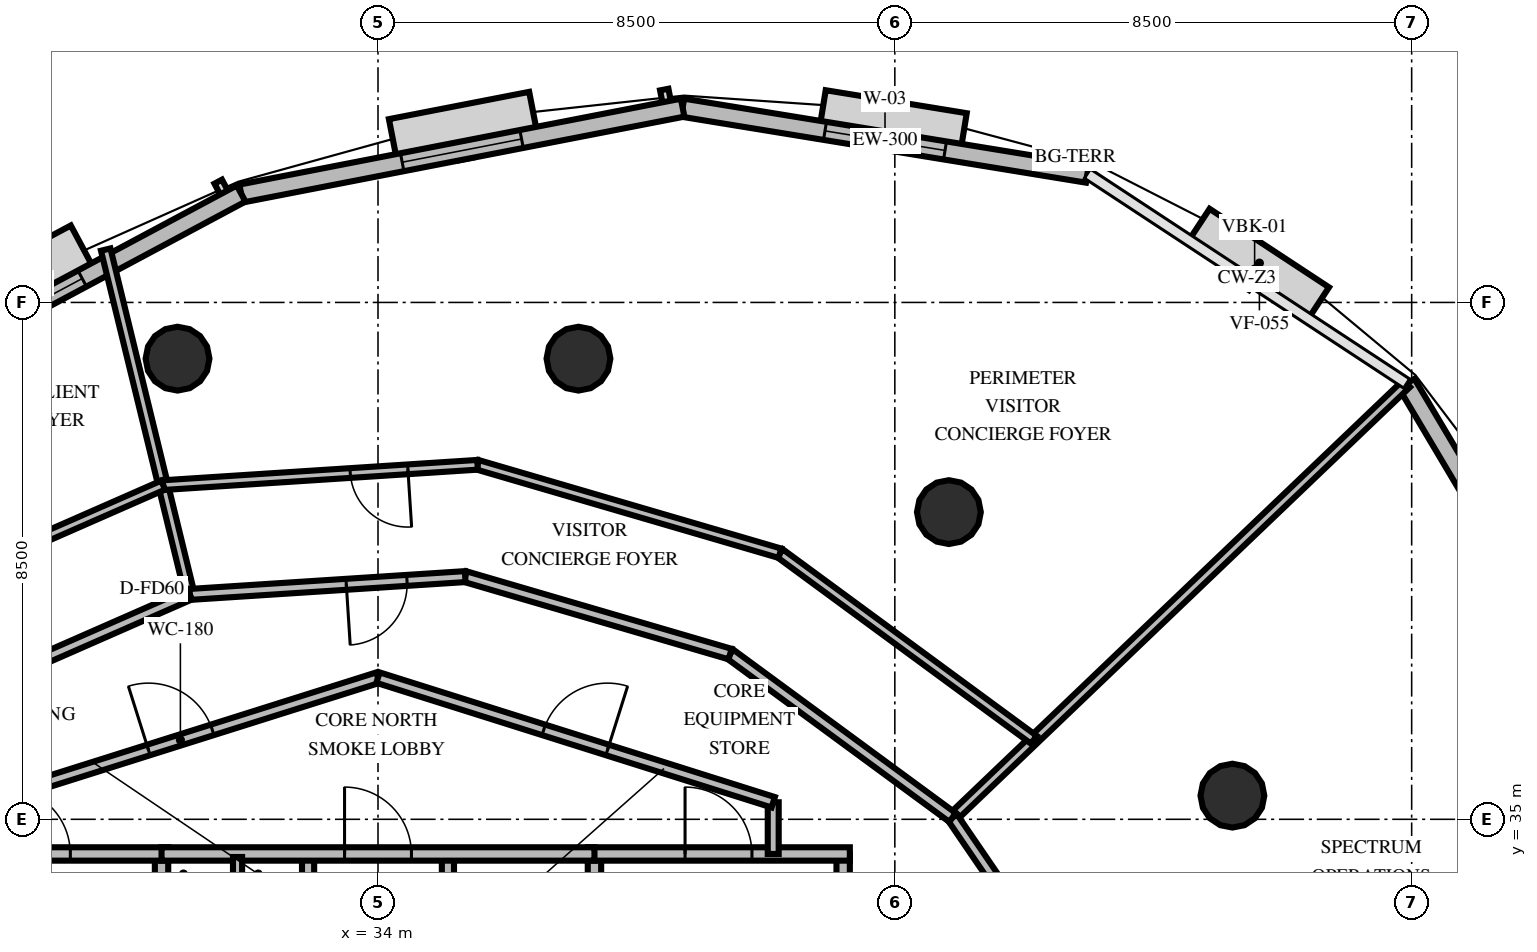
"""IFC4 building model, lengths in metres.
Left out: names, types, materials, properties, quantities, classifications, styles, units other than length and angle.
Written with IfcOpenShell. Run it as: python <this file> out.ifc"""

import sys

from ifc_helpers import new_model, si_unit, direction, frame, frame_2d, origin, origin_2d, place, context, subcontext, project, spatial, rectangle, circle, extrude, element, fill, save


model = new_model("IFC4")
c1 = context("Model", 3, precision=1e-05, world=origin(), true_north=direction((0.0, 1.0)))
c2 = subcontext(c1, "Body", "Model", "MODEL_VIEW")
j1 = project(units=[si_unit("LENGTHUNIT", "METRE"), si_unit("PLANEANGLEUNIT", "RADIAN")], contexts=[c1])
p1 = place(None, origin())
s1 = spatial("IfcSite", under=j1, at=p1, CompositionType="ELEMENT")
p2 = place(p1, origin())
s2 = spatial("IfcBuilding", under=s1, at=p2, CompositionType="ELEMENT")
p3 = place(p2, frame((0.0, 0.0, 213.2)))
s3 = spatial("IfcBuildingStorey", under=s2, at=p3, CompositionType="ELEMENT", Elevation=213.2)
for number, where, z_axis, x_axis in (
    (1, (48.052, 35.389, 0.0), (0.0, 0.0, 1.0), (1.0, 0.0, 0.0)),
    (2, (43.389, 40.052, 0.0), (0.0, 0.0, 1.0), (1.0, 0.0, 0.0)),
    (3, (37.297, 42.575, 0.0), (0.0, 0.0, 1.0), (1.0, 0.0, 0.0)),
    (4, (30.703, 42.575, 0.0), (0.0, 0.0, 1.0), (1.0, 0.0, 0.0)),
):
    element("IfcColumn", number, at=place(p3, frame(where, z_axis=z_axis, x_axis=x_axis)), inside=s3, PredefinedType="COLUMN", context=c2, shape_type="SweptSolid", body=[
        extrude(circle(Radius=0.525, at=origin_2d()), origin(), (0.0, 0.0, 1.0), 3.6),
    ])
p4 = place(p3, frame((45.667, 45.618, 0.0), z_axis=(0.0, 0.0, 1.0), x_axis=(-0.986978419701, 0.160852724701, 0.0)))
e5 = element("IfcWall", 5, at=p4, inside=s3, PredefinedType="SOLIDWALL", context=c2, shape_type="SweptSolid", body=[
    extrude(rectangle(XDim=6.745, YDim=0.3, at=frame_2d((3.373, 0.0))), origin(), (0.0, 0.0, 1.0), 2.66),
])
p5 = place(p4, frame((2.373, 0.0, 0.8)))
e6 = element("IfcOpeningElement", 6, at=p5, cuts=e5, PredefinedType="OPENING", context=c2, shape_type="SweptSolid", body=[
    extrude(rectangle(XDim=2.0, YDim=1.85, at=frame_2d((1.0, 0.925))), frame((0.0, 0.16, 0.0), z_axis=(0.0, -1.0, 0.0), x_axis=(1.0, 0.0, 0.0)), (0.0, 0.0, 1.0), 0.32),
])
p6 = place(p3, frame((39.01, 46.703, 0.0), z_axis=(0.0, 0.0, 1.0), x_axis=(-0.9816114389, -0.190889976216, 0.0)))
e7 = element("IfcWall", 7, at=p6, inside=s3, PredefinedType="SOLIDWALL", context=c2, shape_type="SweptSolid", body=[
    extrude(rectangle(XDim=7.397, YDim=0.3, at=frame_2d((3.699, 0.0))), origin(), (0.0, 0.0, 1.0), 2.66),
])
p7 = place(p6, frame((2.699, 0.0, 0.8)))
e8 = element("IfcOpeningElement", 8, at=p7, cuts=e7, PredefinedType="OPENING", context=c2, shape_type="SweptSolid", body=[
    extrude(rectangle(XDim=2.0, YDim=1.85, at=frame_2d((1.0, 0.925))), frame((0.0, 0.16, 0.0), z_axis=(0.0, -1.0, 0.0), x_axis=(1.0, 0.0, 0.0)), (0.0, 0.0, 1.0), 0.32),
])
p8 = place(p3, frame((31.749, 45.291, 0.0), z_axis=(0.0, 0.0, 1.0), x_axis=(-0.881775109683, -0.47167007107, 0.0)))
e9 = element("IfcWall", 9, at=p8, inside=s3, PredefinedType="SOLIDWALL", context=c2, shape_type="SweptSolid", body=[
    extrude(rectangle(XDim=7.927, YDim=0.3, at=frame_2d((3.964, 0.0))), origin(), (0.0, 0.0, 1.0), 2.66),
])
p9 = place(p8, frame((2.964, 0.0, 0.8)))
e10 = element("IfcOpeningElement", 10, at=p9, cuts=e9, PredefinedType="OPENING", context=c2, shape_type="SweptSolid", body=[
    extrude(rectangle(XDim=2.0, YDim=1.85, at=frame_2d((1.0, 0.925))), frame((0.0, 0.16, 0.0), z_axis=(0.0, -1.0, 0.0), x_axis=(1.0, 0.0, 0.0)), (0.0, 0.0, 1.0), 0.32),
])
p10 = place(p3, frame((54.127, 36.766, 0.0), z_axis=(0.0, 0.0, 1.0), x_axis=(-0.510856559467, 0.859665967483, 0.0)))
e11 = element("IfcWall", 11, at=p10, inside=s3, PredefinedType="SOLIDWALL", context=c2, shape_type="SweptSolid", body=[
    extrude(rectangle(XDim=6.282, YDim=0.3, at=frame_2d((3.141, 0.0))), origin(), (0.0, 0.0, 1.0), 2.66),
])
p11 = place(p10, frame((2.141, 0.0, 0.8)))
e12 = element("IfcOpeningElement", 12, at=p11, cuts=e11, PredefinedType="OPENING", context=c2, shape_type="SweptSolid", body=[
    extrude(rectangle(XDim=2.0, YDim=1.85, at=frame_2d((1.0, 0.925))), frame((0.0, 0.16, 0.0), z_axis=(0.0, -1.0, 0.0), x_axis=(1.0, 0.0, 0.0)), (0.0, 0.0, 1.0), 0.32),
])
p12 = place(p3, frame((30.44, 30.05, 0.0), z_axis=(0.0, 0.0, 1.0), x_axis=(0.0, 1.0, 0.0)))
e13 = element("IfcWall", 13, at=p12, inside=s3, PredefinedType="SOLIDWALL", context=c2, shape_type="SweptSolid", body=[
    extrude(rectangle(XDim=4.38, YDim=0.22, at=frame_2d((2.19, 0.0))), origin(), (0.0, 0.0, 1.0), 2.46),
])
p13 = place(p12, frame((0.8, 0.0, 0.0)))
e14 = element("IfcOpeningElement", 14, at=p13, cuts=e13, PredefinedType="OPENING", context=c2, shape_type="SweptSolid", body=[
    extrude(rectangle(XDim=1.05, YDim=2.1, at=frame_2d((0.525, 1.05))), frame((0.0, 0.12, 0.0), z_axis=(0.0, -1.0, 0.0), x_axis=(1.0, 0.0, 0.0)), (0.0, 0.0, 1.0), 0.24),
])
p14 = place(p3, frame((26.24, 34.43, 0.0), z_axis=(0.0, 0.0, 1.0), x_axis=(1.0, 0.0, 0.0)))
e15 = element("IfcWall", 15, at=p14, inside=s3, PredefinedType="SOLIDWALL", context=c2, shape_type="SweptSolid", body=[
    extrude(rectangle(XDim=4.31, YDim=0.22, at=frame_2d((2.155, 0.0))), origin(), (0.0, 0.0, 1.0), 2.46),
])
p15 = place(p14, frame((1.6, 0.0, 0.0)))
e16 = element("IfcOpeningElement", 16, at=p15, cuts=e15, PredefinedType="OPENING", context=c2, shape_type="SweptSolid", body=[
    extrude(rectangle(XDim=1.1, YDim=2.15, at=frame_2d((0.55, 1.075))), frame((0.0, 0.12, 0.0), z_axis=(0.0, -1.0, 0.0), x_axis=(1.0, 0.0, 0.0)), (0.0, 0.0, 1.0), 0.24),
])
p16 = place(p3, frame((32.85, 30.05, 0.0), z_axis=(0.0, 0.0, 1.0), x_axis=(0.0, 1.0, 0.0)))
e17 = element("IfcWall", 17, at=p16, inside=s3, PredefinedType="SOLIDWALL", context=c2, shape_type="SweptSolid", body=[
    extrude(rectangle(XDim=4.38, YDim=0.2, at=frame_2d((2.19, 0.0))), origin(), (0.0, 0.0, 1.0), 2.46),
])
p17 = place(p16, frame((2.65, 0.0, 0.0)))
e18 = element("IfcOpeningElement", 18, at=p17, cuts=e17, PredefinedType="OPENING", context=c2, shape_type="SweptSolid", body=[
    extrude(rectangle(XDim=0.86, YDim=2.05, at=frame_2d((0.43, 1.025))), frame((0.0, 0.11, 0.0), z_axis=(0.0, -1.0, 0.0), x_axis=(1.0, 0.0, 0.0)), (0.0, 0.0, 1.0), 0.22),
])
p18 = place(p3, frame((37.56, 30.05, 0.0), z_axis=(0.0, 0.0, 1.0), x_axis=(0.0, 1.0, 0.0)))
e19 = element("IfcWall", 19, at=p18, inside=s3, PredefinedType="SOLIDWALL", context=c2, shape_type="SweptSolid", body=[
    extrude(rectangle(XDim=4.38, YDim=0.22, at=frame_2d((2.19, 0.0))), origin(), (0.0, 0.0, 1.0), 2.46),
])
p19 = place(p18, frame((0.8, 0.0, 0.0)))
e20 = element("IfcOpeningElement", 20, at=p19, cuts=e19, PredefinedType="OPENING", context=c2, shape_type="SweptSolid", body=[
    extrude(rectangle(XDim=1.05, YDim=2.1, at=frame_2d((0.525, 1.05))), frame((0.0, 0.12, 0.0), z_axis=(0.0, -1.0, 0.0), x_axis=(1.0, 0.0, 0.0)), (0.0, 0.0, 1.0), 0.24),
])
p20 = place(p3, frame((41.65, 30.05, 0.0), z_axis=(0.0, 0.0, 1.0), x_axis=(0.0, 1.0, 0.0)))
e21 = element("IfcWall", 21, at=p20, inside=s3, PredefinedType="SOLIDWALL", context=c2, shape_type="SweptSolid", body=[
    extrude(rectangle(XDim=4.38, YDim=0.22, at=frame_2d((2.19, 0.0))), origin(), (0.0, 0.0, 1.0), 2.46),
])
p21 = place(p3, frame((37.45, 34.43, 0.0), z_axis=(0.0, 0.0, 1.0), x_axis=(1.0, 0.0, 0.0)))
e22 = element("IfcWall", 22, at=p21, inside=s3, PredefinedType="SOLIDWALL", context=c2, shape_type="SweptSolid", body=[
    extrude(rectangle(XDim=4.31, YDim=0.22, at=frame_2d((2.155, 0.0))), origin(), (0.0, 0.0, 1.0), 2.46),
])
p22 = place(p21, frame((1.6, 0.0, 0.0)))
e23 = element("IfcOpeningElement", 23, at=p22, cuts=e22, PredefinedType="OPENING", context=c2, shape_type="SweptSolid", body=[
    extrude(rectangle(XDim=1.1, YDim=2.15, at=frame_2d((0.55, 1.075))), frame((0.0, 0.12, 0.0), z_axis=(0.0, -1.0, 0.0), x_axis=(1.0, 0.0, 0.0)), (0.0, 0.0, 1.0), 0.24),
])
p23 = place(p3, frame((35.15, 30.05, 0.0), z_axis=(0.0, 0.0, 1.0), x_axis=(0.0, 1.0, 0.0)))
e24 = element("IfcWall", 24, at=p23, inside=s3, PredefinedType="SOLIDWALL", context=c2, shape_type="SweptSolid", body=[
    extrude(rectangle(XDim=4.38, YDim=0.2, at=frame_2d((2.19, 0.0))), origin(), (0.0, 0.0, 1.0), 2.46),
])
p24 = place(p23, frame((2.65, 0.0, 0.0)))
e25 = element("IfcOpeningElement", 25, at=p24, cuts=e24, PredefinedType="OPENING", context=c2, shape_type="SweptSolid", body=[
    extrude(rectangle(XDim=0.86, YDim=2.05, at=frame_2d((0.43, 1.025))), frame((0.0, 0.11, 0.0), z_axis=(0.0, -1.0, 0.0), x_axis=(1.0, 0.0, 0.0)), (0.0, 0.0, 1.0), 0.22),
])
p25 = place(p3, frame((30.44, 34.43, 0.0), z_axis=(0.0, 0.0, 1.0), x_axis=(1.0, 0.0, 0.0)))
e26 = element("IfcWall", 26, at=p25, inside=s3, PredefinedType="SOLIDWALL", context=c2, shape_type="SweptSolid", body=[
    extrude(rectangle(XDim=7.12, YDim=0.22, at=frame_2d((3.56, 0.0))), origin(), (0.0, 0.0, 1.0), 2.46),
])
p26 = place(p25, frame((3.01, 0.0, 0.0)))
e27 = element("IfcOpeningElement", 27, at=p26, cuts=e26, PredefinedType="OPENING", context=c2, shape_type="SweptSolid", body=[
    extrude(rectangle(XDim=1.1, YDim=2.15, at=frame_2d((0.55, 1.075))), frame((0.0, 0.12, 0.0), z_axis=(0.0, -1.0, 0.0), x_axis=(1.0, 0.0, 0.0)), (0.0, 0.0, 1.0), 0.24),
])
p27 = place(p3, frame((31.69, 32.05, 0.0), z_axis=(0.0, 0.0, 1.0), x_axis=(0.0, 1.0, 0.0)))
e28 = element("IfcWall", 28, at=p27, inside=s3, PredefinedType="PARTITIONING", context=c2, shape_type="SweptSolid", body=[
    extrude(rectangle(XDim=2.33, YDim=0.15, at=frame_2d((1.165, 0.0))), origin(), (0.0, 0.0, 1.0), 2.46),
])
p28 = place(p27, frame((0.65, 0.0, 0.0)))
e29 = element("IfcOpeningElement", 29, at=p28, cuts=e28, PredefinedType="OPENING", context=c2, shape_type="SweptSolid", body=[
    extrude(rectangle(XDim=0.86, YDim=2.05, at=frame_2d((0.43, 1.025))), frame((0.0, 0.085, 0.0), z_axis=(0.0, -1.0, 0.0), x_axis=(1.0, 0.0, 0.0)), (0.0, 0.0, 1.0), 0.17),
])
p29 = place(p3, frame((40.5, 35.28, 0.0), z_axis=(0.0, 0.0, 1.0), x_axis=(0.0, -1.0, 0.0)))
e30 = element("IfcWall", 30, at=p29, inside=s3, PredefinedType="PARTITIONING", context=c2, shape_type="SweptSolid", body=[
    extrude(rectangle(XDim=0.85, YDim=0.18, at=frame_2d((0.425, 0.0))), origin(), (0.0, 0.0, 1.0), 2.46),
])
p30 = place(p3, frame((27.5, 35.28, 0.0), z_axis=(0.0, 0.0, 1.0), x_axis=(0.953691418528, 0.300786765376, 0.0)))
e31 = element("IfcWall", 31, at=p30, inside=s3, PredefinedType="PARTITIONING", context=c2, shape_type="SweptSolid", body=[
    extrude(rectangle(XDim=6.816, YDim=0.18, at=frame_2d((3.408, 0.0))), origin(), (0.0, 0.0, 1.0), 2.46),
])
p31 = place(p30, frame((2.858, 0.0, 0.0)))
e32 = element("IfcOpeningElement", 32, at=p31, cuts=e31, PredefinedType="OPENING", context=c2, shape_type="SweptSolid", body=[
    extrude(rectangle(XDim=1.1, YDim=2.15, at=frame_2d((0.55, 1.075))), frame((0.0, 0.1, 0.0), z_axis=(0.0, -1.0, 0.0), x_axis=(1.0, 0.0, 0.0)), (0.0, 0.0, 1.0), 0.2),
])
p32 = place(p3, frame((34.0, 37.33, 0.0), z_axis=(0.0, 0.0, 1.0), x_axis=(0.953691418528, -0.300786765376, 0.0)))
e33 = element("IfcWall", 33, at=p32, inside=s3, PredefinedType="PARTITIONING", context=c2, shape_type="SweptSolid", body=[
    extrude(rectangle(XDim=6.816, YDim=0.18, at=frame_2d((3.408, 0.0))), origin(), (0.0, 0.0, 1.0), 2.46),
])
p33 = place(p32, frame((2.858, 0.0, 0.0)))
e34 = element("IfcOpeningElement", 34, at=p33, cuts=e33, PredefinedType="OPENING", context=c2, shape_type="SweptSolid", body=[
    extrude(rectangle(XDim=1.1, YDim=2.15, at=frame_2d((0.55, 1.075))), frame((0.0, 0.1, 0.0), z_axis=(0.0, -1.0, 0.0), x_axis=(1.0, 0.0, 0.0)), (0.0, 0.0, 1.0), 0.2),
])
p34 = place(p3, frame((43.449, 35.03, 0.0), z_axis=(0.0, 0.0, 1.0), x_axis=(0.722972327668, 0.690876988636, 0.0)))
e35 = element("IfcWall", 35, at=p34, inside=s3, PredefinedType="PARTITIONING", context=c2, shape_type="SweptSolid", body=[
    extrude(rectangle(XDim=10.33, YDim=0.16, at=frame_2d((5.165, 0.0))), origin(), (0.0, 0.0, 1.0), 2.46),
])
p35 = place(p3, frame((45.842, 31.531, 0.0), z_axis=(0.0, 0.0, 1.0), x_axis=(-0.564496027552, 0.82543578483, 0.0)))
e36 = element("IfcWall", 36, at=p35, inside=s3, PredefinedType="PARTITIONING", context=c2, shape_type="SweptSolid", body=[
    extrude(rectangle(XDim=4.239, YDim=0.18, at=frame_2d((2.12, 0.0))), origin(), (0.0, 0.0, 1.0), 2.46),
])
p36 = place(p3, frame((30.905, 38.698, 0.0), z_axis=(0.0, 0.0, 1.0), x_axis=(-0.236843531304, 0.971547807202, 0.0)))
e37 = element("IfcWall", 37, at=p36, inside=s3, PredefinedType="PARTITIONING", context=c2, shape_type="SweptSolid", body=[
    extrude(rectangle(XDim=5.837, YDim=0.16, at=frame_2d((2.919, 0.0))), origin(), (0.0, 0.0, 1.0), 2.46),
])
p37 = place(p3, frame((43.449, 35.03, 0.0), z_axis=(0.0, 0.0, 1.0), x_axis=(-0.805924234129, 0.592018689606, 0.0)))
e38 = element("IfcWall", 38, at=p37, inside=s3, PredefinedType="PARTITIONING", context=c2, shape_type="SweptSolid", body=[
    extrude(rectangle(XDim=4.539, YDim=0.18, at=frame_2d((2.27, 0.0))), origin(), (0.0, 0.0, 1.0), 2.46),
])
p38 = place(p3, frame((39.791, 37.717, 0.0), z_axis=(0.0, 0.0, 1.0), x_axis=(-0.95979856343, 0.280689717726, 0.0)))
e39 = element("IfcWall", 39, at=p38, inside=s3, PredefinedType="PARTITIONING", context=c2, shape_type="SweptSolid", body=[
    extrude(rectangle(XDim=4.539, YDim=0.18, at=frame_2d((2.27, 0.0))), origin(), (0.0, 0.0, 1.0), 2.46),
])
p39 = place(p3, frame((35.434, 38.991, 0.0), z_axis=(0.0, 0.0, 1.0), x_axis=(-0.997911351123, -0.064598260804, 0.0)))
e40 = element("IfcWall", 40, at=p39, inside=s3, PredefinedType="PARTITIONING", context=c2, shape_type="SweptSolid", body=[
    extrude(rectangle(XDim=4.539, YDim=0.18, at=frame_2d((2.27, 0.0))), origin(), (0.0, 0.0, 1.0), 2.46),
])
p40 = place(p39, frame((0.96, 0.0, 0.0)))
e41 = element("IfcOpeningElement", 41, at=p40, cuts=e40, PredefinedType="OPENING", context=c2, shape_type="SweptSolid", body=[
    extrude(rectangle(XDim=1.0, YDim=2.15, at=frame_2d((0.5, 1.075))), frame((0.0, 0.1, 0.0), z_axis=(0.0, -1.0, 0.0), x_axis=(1.0, 0.0, 0.0)), (0.0, 0.0, 1.0), 0.2),
])
p41 = place(p3, frame((44.787, 36.308, 0.0), z_axis=(0.0, 0.0, 1.0), x_axis=(-0.80594787713, 0.591986502675, 0.0)))
e42 = element("IfcWall", 42, at=p41, inside=s3, PredefinedType="PARTITIONING", context=c2, shape_type="SweptSolid", body=[
    extrude(rectangle(XDim=5.181, YDim=0.16, at=frame_2d((2.591, 0.0))), origin(), (0.0, 0.0, 1.0), 2.46),
])
p42 = place(p3, frame((40.611, 39.375, 0.0), z_axis=(0.0, 0.0, 1.0), x_axis=(-0.959803988125, 0.280671167702, 0.0)))
e43 = element("IfcWall", 43, at=p42, inside=s3, PredefinedType="PARTITIONING", context=c2, shape_type="SweptSolid", body=[
    extrude(rectangle(XDim=5.182, YDim=0.16, at=frame_2d((2.591, 0.0))), origin(), (0.0, 0.0, 1.0), 2.46),
])
p43 = place(p3, frame((35.637, 40.83, 0.0), z_axis=(0.0, 0.0, 1.0), x_axis=(-0.99791758747, -0.064501849728, 0.0)))
e44 = element("IfcWall", 44, at=p43, inside=s3, PredefinedType="PARTITIONING", context=c2, shape_type="SweptSolid", body=[
    extrude(rectangle(XDim=5.182, YDim=0.16, at=frame_2d((2.591, 0.0))), origin(), (0.0, 0.0, 1.0), 2.46),
])
p44 = place(p43, frame((1.148, 0.0, 0.0)))
e45 = element("IfcOpeningElement", 45, at=p44, cuts=e44, PredefinedType="OPENING", context=c2, shape_type="SweptSolid", body=[
    extrude(rectangle(XDim=0.95, YDim=2.15, at=frame_2d((0.475, 1.075))), frame((0.0, 0.09, 0.0), z_axis=(0.0, -1.0, 0.0), x_axis=(1.0, 0.0, 0.0)), (0.0, 0.0, 1.0), 0.18),
])
p45 = place(p3, frame((30.905, 38.698, 0.0), z_axis=(0.0, 0.0, 1.0), x_axis=(-0.915662861199, -0.401947166455, 0.0)))
e46 = element("IfcWall", 46, at=p45, inside=s3, PredefinedType="PARTITIONING", context=c2, shape_type="SweptSolid", body=[
    extrude(rectangle(XDim=4.539, YDim=0.18, at=frame_2d((2.27, 0.0))), origin(), (0.0, 0.0, 1.0), 2.46),
])
p46 = place(p3, frame((30.466, 40.496, 0.0), z_axis=(0.0, 0.0, 1.0), x_axis=(-0.915661371958, -0.401950559029, 0.0)))
e47 = element("IfcWall", 47, at=p46, inside=s3, PredefinedType="PARTITIONING", context=c2, shape_type="SweptSolid", body=[
    extrude(rectangle(XDim=5.182, YDim=0.16, at=frame_2d((2.591, 0.0))), origin(), (0.0, 0.0, 1.0), 2.46),
])
p47 = place(p5, origin())
e48 = element("IfcWindow", 48, at=p47, inside=s3, PartitioningType="SINGLE_PANEL", PredefinedType="WINDOW", context=c2, shape_type="SweptSolid", body=[
    extrude(rectangle(XDim=2.0, YDim=1.85, at=frame_2d((1.0, 0.925))), frame((0.0, 0.03, 0.0), z_axis=(0.0, -1.0, 0.0), x_axis=(1.0, 0.0, 0.0)), (0.0, 0.0, 1.0), 0.06),
])
fill(e6, e48)
p48 = place(p7, origin())
e49 = element("IfcWindow", 49, at=p48, inside=s3, PartitioningType="SINGLE_PANEL", PredefinedType="WINDOW", context=c2, shape_type="SweptSolid", body=[
    extrude(rectangle(XDim=2.0, YDim=1.85, at=frame_2d((1.0, 0.925))), frame((0.0, 0.03, 0.0), z_axis=(0.0, -1.0, 0.0), x_axis=(1.0, 0.0, 0.0)), (0.0, 0.0, 1.0), 0.06),
])
fill(e8, e49)
p49 = place(p9, origin())
e50 = element("IfcWindow", 50, at=p49, inside=s3, PartitioningType="SINGLE_PANEL", PredefinedType="WINDOW", context=c2, shape_type="SweptSolid", body=[
    extrude(rectangle(XDim=2.0, YDim=1.85, at=frame_2d((1.0, 0.925))), frame((0.0, 0.03, 0.0), z_axis=(0.0, -1.0, 0.0), x_axis=(1.0, 0.0, 0.0)), (0.0, 0.0, 1.0), 0.06),
])
fill(e10, e50)
p50 = place(p15, origin())
e51 = element("IfcDoor", 51, at=p50, inside=s3, OperationType="SINGLE_SWING_LEFT", PredefinedType="DOOR", context=c2, shape_type="SweptSolid", body=[
    extrude(rectangle(XDim=1.1, YDim=2.15, at=frame_2d((0.55, 1.075))), frame((0.0, 0.025, 0.0), z_axis=(0.0, -1.0, 0.0), x_axis=(1.0, 0.0, 0.0)), (0.0, 0.0, 1.0), 0.05),
])
fill(e16, e51)
p51 = place(p22, origin())
e52 = element("IfcDoor", 52, at=p51, inside=s3, OperationType="SINGLE_SWING_LEFT", PredefinedType="DOOR", context=c2, shape_type="SweptSolid", body=[
    extrude(rectangle(XDim=1.1, YDim=2.15, at=frame_2d((0.55, 1.075))), frame((0.0, 0.025, 0.0), z_axis=(0.0, -1.0, 0.0), x_axis=(1.0, 0.0, 0.0)), (0.0, 0.0, 1.0), 0.05),
])
fill(e23, e52)
p52 = place(p26, origin())
e53 = element("IfcDoor", 53, at=p52, inside=s3, OperationType="SINGLE_SWING_LEFT", PredefinedType="DOOR", context=c2, shape_type="SweptSolid", body=[
    extrude(rectangle(XDim=1.1, YDim=2.15, at=frame_2d((0.55, 1.075))), frame((0.0, 0.025, 0.0), z_axis=(0.0, -1.0, 0.0), x_axis=(1.0, 0.0, 0.0)), (0.0, 0.0, 1.0), 0.05),
])
fill(e27, e53)
p53 = place(p31, origin())
e54 = element("IfcDoor", 54, at=p53, inside=s3, OperationType="SINGLE_SWING_LEFT", PredefinedType="DOOR", context=c2, shape_type="SweptSolid", body=[
    extrude(rectangle(XDim=1.1, YDim=2.15, at=frame_2d((0.55, 1.075))), frame((0.0, 0.025, 0.0), z_axis=(0.0, -1.0, 0.0), x_axis=(1.0, 0.0, 0.0)), (0.0, 0.0, 1.0), 0.05),
])
fill(e32, e54)
p54 = place(p33, origin())
e55 = element("IfcDoor", 55, at=p54, inside=s3, OperationType="SINGLE_SWING_RIGHT", PredefinedType="DOOR", context=c2, shape_type="SweptSolid", body=[
    extrude(rectangle(XDim=1.1, YDim=2.15, at=frame_2d((0.55, 1.075))), frame((0.0, 0.025, 0.0), z_axis=(0.0, -1.0, 0.0), x_axis=(1.0, 0.0, 0.0)), (0.0, 0.0, 1.0), 0.05),
])
fill(e34, e55)
p55 = place(p40, origin())
e56 = element("IfcDoor", 56, at=p55, inside=s3, OperationType="SINGLE_SWING_RIGHT", PredefinedType="DOOR", context=c2, shape_type="SweptSolid", body=[
    extrude(rectangle(XDim=1.0, YDim=2.15, at=frame_2d((0.5, 1.075))), frame((0.0, 0.025, 0.0), z_axis=(0.0, -1.0, 0.0), x_axis=(1.0, 0.0, 0.0)), (0.0, 0.0, 1.0), 0.05),
])
fill(e41, e56)
p56 = place(p44, origin())
e57 = element("IfcDoor", 57, at=p56, inside=s3, OperationType="SINGLE_SWING_LEFT", PredefinedType="DOOR", context=c2, shape_type="SweptSolid", body=[
    extrude(rectangle(XDim=0.95, YDim=2.15, at=frame_2d((0.475, 1.075))), frame((0.0, 0.025, 0.0), z_axis=(0.0, -1.0, 0.0), x_axis=(1.0, 0.0, 0.0)), (0.0, 0.0, 1.0), 0.05),
])
fill(e45, e57)
save(model, sys.argv[1])
